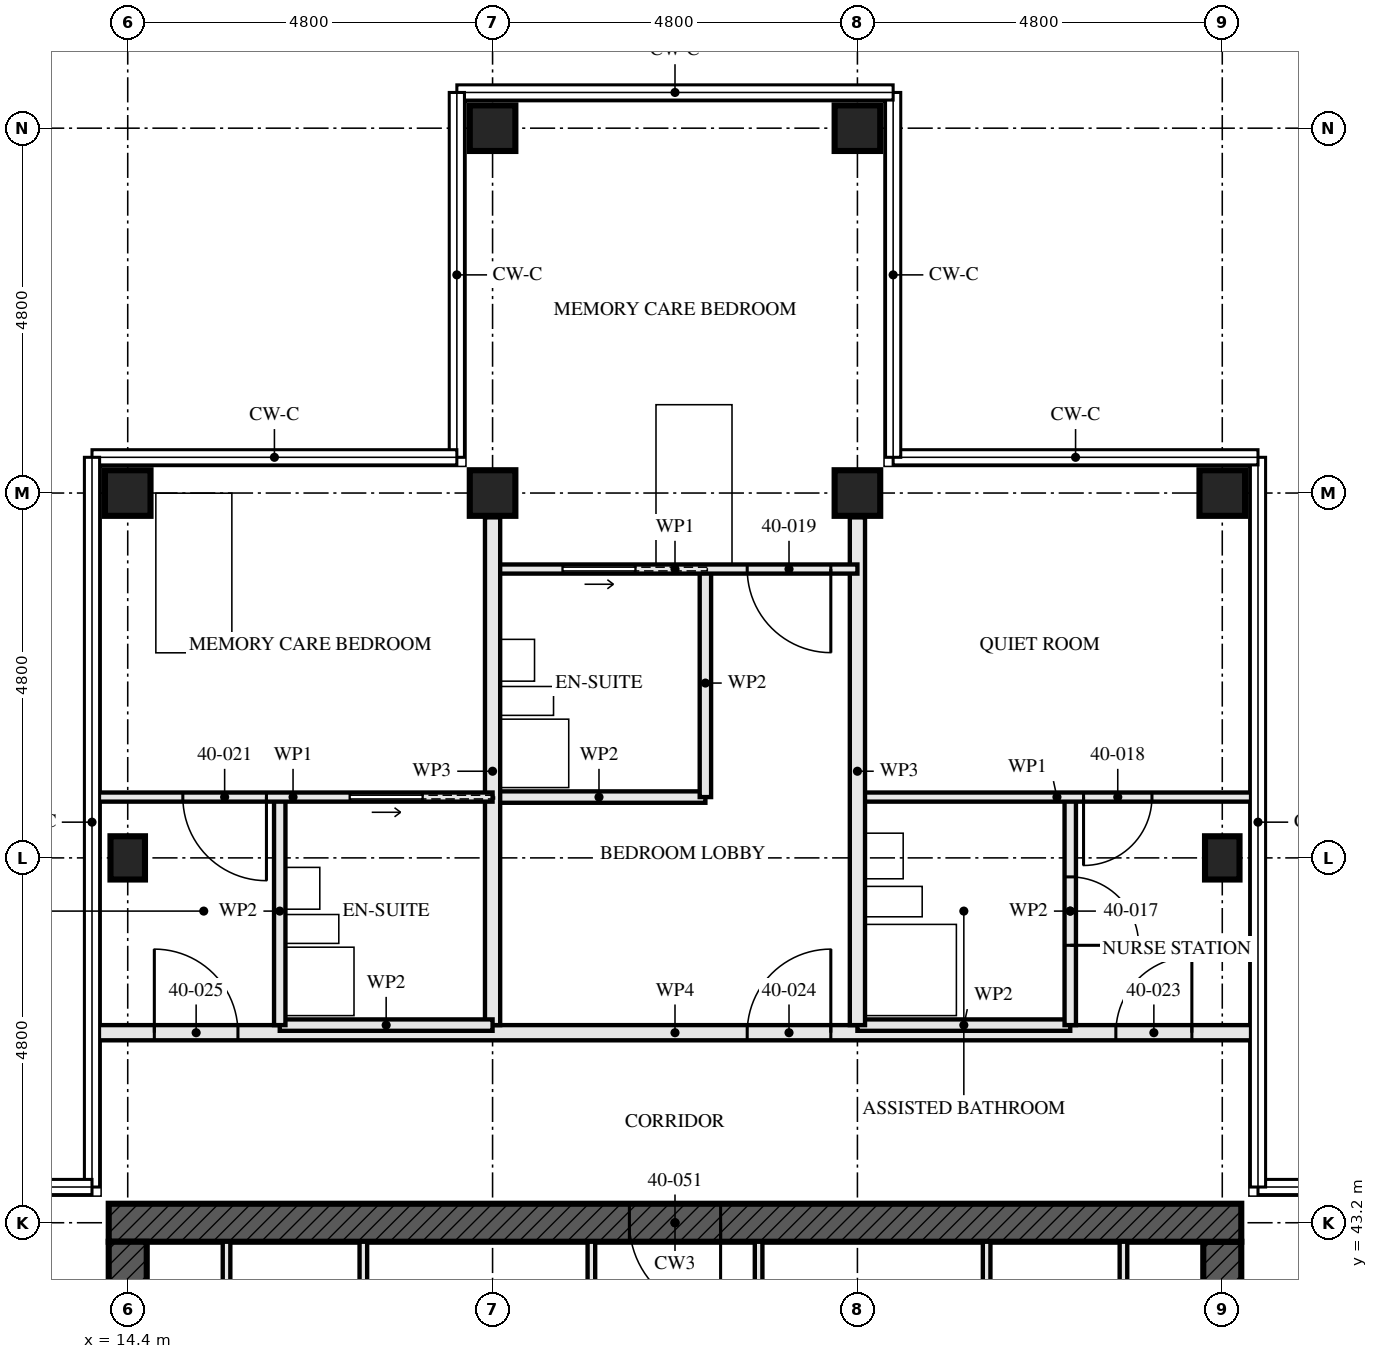
"""IFC4 building model, lengths in metres.
Left out: names, types, materials, properties, quantities, classifications, styles, units other than length and angle.
Written with IfcOpenShell. Run it as: python <this file> out.ifc"""

import sys

from ifc_helpers import new_model, si_unit, direction, frame, frame_2d, origin, origin_2d, place, context, subcontext, project, spatial, rectangle, hollow_rectangle, i_section, extrude, element, fill, save


model = new_model("IFC4")
c1 = context("Model", 3, precision=1e-05, world=origin(), true_north=direction((0.0, 1.0)))
c2 = subcontext(c1, "Body", "Model", "MODEL_VIEW")
j1 = project(units=[si_unit("LENGTHUNIT", "METRE"), si_unit("PLANEANGLEUNIT", "RADIAN")], contexts=[c1])
p1 = place(None, origin())
s1 = spatial("IfcSite", under=j1, at=p1, CompositionType="ELEMENT")
p2 = place(p1, origin())
s2 = spatial("IfcBuilding", under=s1, at=p2, CompositionType="ELEMENT")
p3 = place(p2, frame((0.0, 0.0, 148.0)))
s3 = spatial("IfcBuildingStorey", under=s2, at=p3, CompositionType="ELEMENT", Elevation=148.0)
p4 = place(p3, frame((14.4, 48.0, 0.0), z_axis=(0.0, 0.0, 1.0), x_axis=(1.0, 0.0, 0.0)))
e1 = element("IfcColumn", 1, at=p4, inside=s3, PredefinedType="COLUMN", context=c2, shape_type="SweptSolid", body=[
    extrude(i_section(OverallWidth=0.454, OverallDepth=0.569, WebThickness=0.078, FlangeThickness=0.125, FilletRadius=0.015, at=origin_2d()), origin(), (0.0, 0.0, 1.0), 3.5),
])
for number, where, z_axis, x_axis in (
    (2, (14.4, 52.8, 0.0), (0.0, 0.0, 1.0), (0.0, 1.0, 0.0)),
    (3, (19.2, 52.8, 0.0), (0.0, 0.0, 1.0), (0.0, 1.0, 0.0)),
    (4, (19.2, 57.6, 0.0), (0.0, 0.0, 1.0), (0.0, 1.0, 0.0)),
    (5, (24.0, 52.8, 0.0), (0.0, 0.0, 1.0), (0.0, 1.0, 0.0)),
    (6, (24.0, 57.6, 0.0), (0.0, 0.0, 1.0), (0.0, 1.0, 0.0)),
):
    element("IfcColumn", number, at=place(p3, frame(where, z_axis=z_axis, x_axis=x_axis)), inside=s3, PredefinedType="COLUMN", context=c2, shape_type="SweptSolid", body=[
        extrude(hollow_rectangle(XDim=0.6, YDim=0.6, WallThickness=0.05, at=origin_2d()), origin(), (0.0, 0.0, 1.0), 3.5),
    ])
p5 = place(p3, frame((28.8, 48.0, 0.0), z_axis=(0.0, 0.0, 1.0), x_axis=(1.0, 0.0, 0.0)))
e7 = element("IfcColumn", 7, at=p5, inside=s3, PredefinedType="COLUMN", context=c2, shape_type="SweptSolid", body=[
    extrude(i_section(OverallWidth=0.454, OverallDepth=0.569, WebThickness=0.078, FlangeThickness=0.125, FilletRadius=0.015, at=origin_2d()), origin(), (0.0, 0.0, 1.0), 3.5),
])
p6 = place(p3, frame((28.8, 52.8, 0.0), z_axis=(0.0, 0.0, 1.0), x_axis=(0.0, 1.0, 0.0)))
e8 = element("IfcColumn", 8, at=p6, inside=s3, PredefinedType="COLUMN", context=c2, shape_type="SweptSolid", body=[
    extrude(hollow_rectangle(XDim=0.6, YDim=0.6, WallThickness=0.05, at=origin_2d()), origin(), (0.0, 0.0, 1.0), 3.5),
])
p7 = place(p3, frame((29.05, 43.2, -0.17), z_axis=(0.0, 0.0, 1.0), x_axis=(-1.0, 0.0, 0.0)))
e9 = element("IfcWall", 9, at=p7, inside=s3, PredefinedType="SHEAR", context=c2, shape_type="SweptSolid", body=[
    extrude(rectangle(XDim=14.9, YDim=0.5, at=frame_2d((7.45, 0.0))), origin(), (0.0, 0.0, 1.0), 3.5),
])
p8 = place(p7, frame((6.85, 0.0, 0.17)))
e10 = element("IfcOpeningElement", 10, at=p8, cuts=e9, PredefinedType="OPENING", context=c2, shape_type="SweptSolid", body=[
    extrude(rectangle(XDim=1.2, YDim=2.1, at=frame_2d((0.6, 1.05))), frame((0.0, 0.26, 0.0), z_axis=(0.0, -1.0, 0.0), x_axis=(1.0, 0.0, 0.0)), (0.0, 0.0, 1.0), 0.521),
])
p9 = place(p3, frame((14.4, 42.95, -0.17), z_axis=(0.0, 0.0, 1.0), x_axis=(0.0, -1.0, 0.0)))
e11 = element("IfcWall", 11, at=p9, inside=s3, PredefinedType="SHEAR", context=c2, shape_type="SweptSolid", body=[
    extrude(rectangle(XDim=13.9, YDim=0.5, at=frame_2d((6.95, 0.0))), origin(), (0.0, 0.0, 1.0), 3.5),
])
p10 = place(p9, frame((6.35, 0.0, 0.17)))
e12 = element("IfcOpeningElement", 12, at=p10, cuts=e11, PredefinedType="OPENING", context=c2, shape_type="SweptSolid", body=[
    extrude(rectangle(XDim=1.2, YDim=2.1, at=frame_2d((0.6, 1.05))), frame((0.0, 0.26, 0.0), z_axis=(0.0, -1.0, 0.0), x_axis=(1.0, 0.0, 0.0)), (0.0, 0.0, 1.0), 0.521),
])
p11 = place(p3, frame((28.8, 29.05, -0.17), z_axis=(0.0, 0.0, 1.0), x_axis=(0.0, 1.0, 0.0)))
e13 = element("IfcWall", 13, at=p11, inside=s3, PredefinedType="SHEAR", context=c2, shape_type="SweptSolid", body=[
    extrude(rectangle(XDim=13.9, YDim=0.5, at=frame_2d((6.95, 0.0))), origin(), (0.0, 0.0, 1.0), 3.5),
])
p12 = place(p11, frame((6.35, 0.0, 0.17)))
e14 = element("IfcOpeningElement", 14, at=p12, cuts=e13, PredefinedType="OPENING", context=c2, shape_type="SweptSolid", body=[
    extrude(rectangle(XDim=1.2, YDim=2.1, at=frame_2d((0.6, 1.05))), frame((0.0, 0.26, 0.0), z_axis=(0.0, -1.0, 0.0), x_axis=(1.0, 0.0, 0.0)), (0.0, 0.0, 1.0), 0.521),
])
p13 = place(p3, frame((26.8, 48.8, 0.0), z_axis=(0.0, 0.0, 1.0), x_axis=(0.0, -1.0, 0.0)))
e15 = element("IfcWall", 15, at=p13, inside=s3, PredefinedType="PARTITIONING", context=c2, shape_type="SweptSolid", body=[
    extrude(rectangle(XDim=3.0, YDim=0.15, at=frame_2d((1.5, 0.0))), origin(), (0.0, 0.0, 1.0), 2.55),
])
p14 = place(p13, frame((1.05, 0.0, 0.0)))
e16 = element("IfcOpeningElement", 16, at=p14, cuts=e15, PredefinedType="OPENING", context=c2, shape_type="SweptSolid", body=[
    extrude(rectangle(XDim=0.9, YDim=2.1, at=frame_2d((0.45, 1.05))), frame((0.0, 0.085, 0.0), z_axis=(0.0, -1.0, 0.0), x_axis=(1.0, 0.0, 0.0)), (0.0, 0.0, 1.0), 0.171),
])
p15 = place(p3, frame((26.8, 45.8, 0.0), z_axis=(0.0, 0.0, 1.0), x_axis=(-1.0, 0.0, 0.0)))
e17 = element("IfcWall", 17, at=p15, inside=s3, PredefinedType="PARTITIONING", context=c2, shape_type="SweptSolid", body=[
    extrude(rectangle(XDim=2.8, YDim=0.15, at=frame_2d((1.4, 0.0))), origin(), (0.0, 0.0, 1.0), 3.33),
])
p16 = place(p3, frame((29.25, 48.8, 0.0), z_axis=(0.0, 0.0, 1.0), x_axis=(-1.0, 0.0, 0.0)))
e18 = element("IfcWall", 18, at=p16, inside=s3, PredefinedType="PARTITIONING", context=c2, shape_type="SweptSolid", body=[
    extrude(rectangle(XDim=5.25, YDim=0.12, at=frame_2d((2.625, 0.0))), origin(), (0.0, 0.0, 1.0), 2.32),
])
p17 = place(p16, frame((1.375, 0.0, 0.0)))
e19 = element("IfcOpeningElement", 19, at=p17, cuts=e18, PredefinedType="OPENING", context=c2, shape_type="SweptSolid", body=[
    extrude(rectangle(XDim=0.9, YDim=2.1, at=frame_2d((0.45, 1.05))), frame((0.0, 0.071, 0.0), z_axis=(0.0, -1.0, 0.0), x_axis=(1.0, 0.0, 0.0)), (0.0, 0.0, 1.0), 0.141),
])
p18 = place(p3, frame((24.0, 52.48, 0.0), z_axis=(0.0, 0.0, 1.0), x_axis=(0.0, -1.0, 0.0)))
e20 = element("IfcWall", 20, at=p18, inside=s3, PredefinedType="PARTITIONING", context=c2, shape_type="SweptSolid", body=[
    extrude(rectangle(XDim=6.68, YDim=0.2, at=frame_2d((3.34, 0.0))), origin(), (0.0, 0.0, 1.0), 2.55),
])
p19 = place(p3, frame((22.0, 51.8, 0.0), z_axis=(0.0, 0.0, 1.0), x_axis=(0.0, -1.0, 0.0)))
e21 = element("IfcWall", 21, at=p19, inside=s3, PredefinedType="PARTITIONING", context=c2, shape_type="SweptSolid", body=[
    extrude(rectangle(XDim=3.0, YDim=0.15, at=frame_2d((1.5, 0.0))), origin(), (0.0, 0.0, 1.0), 3.33),
])
p20 = place(p3, frame((22.0, 48.8, 0.0), z_axis=(0.0, 0.0, 1.0), x_axis=(-1.0, 0.0, 0.0)))
e22 = element("IfcWall", 22, at=p20, inside=s3, PredefinedType="PARTITIONING", context=c2, shape_type="SweptSolid", body=[
    extrude(rectangle(XDim=2.8, YDim=0.15, at=frame_2d((1.4, 0.0))), origin(), (0.0, 0.0, 1.0), 3.33),
])
p21 = place(p3, frame((24.0, 51.8, 0.0), z_axis=(0.0, 0.0, 1.0), x_axis=(-1.0, 0.0, 0.0)))
e23 = element("IfcWall", 23, at=p21, inside=s3, PredefinedType="PARTITIONING", context=c2, shape_type="SweptSolid", body=[
    extrude(rectangle(XDim=4.8, YDim=0.12, at=frame_2d((2.4, 0.0))), origin(), (0.0, 0.0, 1.0), 3.33),
])
p22 = place(p21, frame((0.35, 0.0, 0.0)))
e24 = element("IfcOpeningElement", 24, at=p22, cuts=e23, PredefinedType="OPENING", context=c2, shape_type="SweptSolid", body=[
    extrude(rectangle(XDim=1.1, YDim=2.1, at=frame_2d((0.55, 1.05))), frame((0.0, 0.071, 0.0), z_axis=(0.0, -1.0, 0.0), x_axis=(1.0, 0.0, 0.0)), (0.0, 0.0, 1.0), 0.141),
])
p23 = place(p21, frame((2.925, 0.0, 0.0)))
e25 = element("IfcOpeningElement", 25, at=p23, cuts=e23, PredefinedType="OPENING", context=c2, shape_type="SweptSolid", body=[
    extrude(rectangle(XDim=0.95, YDim=2.1, at=frame_2d((0.475, 1.05))), frame((0.0, 0.071, 0.0), z_axis=(0.0, -1.0, 0.0), x_axis=(1.0, 0.0, 0.0)), (0.0, 0.0, 1.0), 0.141),
])
p24 = place(p3, frame((19.2, 52.48, 0.0), z_axis=(0.0, 0.0, 1.0), x_axis=(0.0, -1.0, 0.0)))
e26 = element("IfcWall", 26, at=p24, inside=s3, PredefinedType="PARTITIONING", context=c2, shape_type="SweptSolid", body=[
    extrude(rectangle(XDim=6.68, YDim=0.2, at=frame_2d((3.34, 0.0))), origin(), (0.0, 0.0, 1.0), 2.55),
])
p25 = place(p3, frame((16.4, 48.8, 0.0), z_axis=(0.0, 0.0, 1.0), x_axis=(0.0, -1.0, 0.0)))
e27 = element("IfcWall", 27, at=p25, inside=s3, PredefinedType="PARTITIONING", context=c2, shape_type="SweptSolid", body=[
    extrude(rectangle(XDim=3.0, YDim=0.15, at=frame_2d((1.5, 0.0))), origin(), (0.0, 0.0, 1.0), 2.55),
])
p26 = place(p3, frame((19.2, 45.8, 0.0), z_axis=(0.0, 0.0, 1.0), x_axis=(-1.0, 0.0, 0.0)))
e28 = element("IfcWall", 28, at=p26, inside=s3, PredefinedType="PARTITIONING", context=c2, shape_type="SweptSolid", body=[
    extrude(rectangle(XDim=2.8, YDim=0.15, at=frame_2d((1.4, 0.0))), origin(), (0.0, 0.0, 1.0), 3.33),
])
p27 = place(p3, frame((19.2, 48.8, 0.0), z_axis=(0.0, 0.0, 1.0), x_axis=(-1.0, 0.0, 0.0)))
e29 = element("IfcWall", 29, at=p27, inside=s3, PredefinedType="PARTITIONING", context=c2, shape_type="SweptSolid", body=[
    extrude(rectangle(XDim=5.25, YDim=0.12, at=frame_2d((2.625, 0.0))), origin(), (0.0, 0.0, 1.0), 2.32),
])
p28 = place(p27, frame((2.975, 0.0, 0.0)))
e30 = element("IfcOpeningElement", 30, at=p28, cuts=e29, PredefinedType="OPENING", context=c2, shape_type="SweptSolid", body=[
    extrude(rectangle(XDim=1.1, YDim=2.1, at=frame_2d((0.55, 1.05))), frame((0.0, 0.071, 0.0), z_axis=(0.0, -1.0, 0.0), x_axis=(1.0, 0.0, 0.0)), (0.0, 0.0, 1.0), 0.141),
])
p29 = place(p27, frame((0.925, 0.0, 0.0)))
e31 = element("IfcOpeningElement", 31, at=p29, cuts=e29, PredefinedType="OPENING", context=c2, shape_type="SweptSolid", body=[
    extrude(rectangle(XDim=0.95, YDim=2.1, at=frame_2d((0.475, 1.05))), frame((0.0, 0.071, 0.0), z_axis=(0.0, -1.0, 0.0), x_axis=(1.0, 0.0, 0.0)), (0.0, 0.0, 1.0), 0.141),
])
p30 = place(p3, frame((29.25, 45.7, 0.0), z_axis=(0.0, 0.0, 1.0), x_axis=(-1.0, 0.0, 0.0)))
e32 = element("IfcWall", 32, at=p30, inside=s3, PredefinedType="PARTITIONING", context=c2, shape_type="SweptSolid", body=[
    extrude(rectangle(XDim=15.3, YDim=0.2, at=frame_2d((7.65, 0.0))), origin(), (0.0, 0.0, 1.0), 2.32),
])
p31 = place(p30, frame((0.85, 0.0, 0.0)))
e33 = element("IfcOpeningElement", 33, at=p31, cuts=e32, PredefinedType="OPENING", context=c2, shape_type="SweptSolid", body=[
    extrude(rectangle(XDim=1.0, YDim=2.1, at=frame_2d((0.5, 1.05))), frame((0.0, 0.111, 0.0), z_axis=(0.0, -1.0, 0.0), x_axis=(1.0, 0.0, 0.0)), (0.0, 0.0, 1.0), 0.221),
])
p32 = place(p30, frame((5.6, 0.0, 0.0)))
e34 = element("IfcOpeningElement", 34, at=p32, cuts=e32, PredefinedType="OPENING", context=c2, shape_type="SweptSolid", body=[
    extrude(rectangle(XDim=1.1, YDim=2.1, at=frame_2d((0.55, 1.05))), frame((0.0, 0.111, 0.0), z_axis=(0.0, -1.0, 0.0), x_axis=(1.0, 0.0, 0.0)), (0.0, 0.0, 1.0), 0.221),
])
p33 = place(p30, frame((13.4, 0.0, 0.0)))
e35 = element("IfcOpeningElement", 35, at=p33, cuts=e32, PredefinedType="OPENING", context=c2, shape_type="SweptSolid", body=[
    extrude(rectangle(XDim=1.1, YDim=2.1, at=frame_2d((0.55, 1.05))), frame((0.0, 0.111, 0.0), z_axis=(0.0, -1.0, 0.0), x_axis=(1.0, 0.0, 0.0)), (0.0, 0.0, 1.0), 0.221),
])
for number, where, z_axis, x_axis in (
    (36, (15.7, 37.15, 0.0), (0.0, 0.0, 1.0), (0.0, 1.0, 0.0)),
    (37, (27.5, 37.15, 0.0), (0.0, 0.0, 1.0), (0.0, 1.0, 0.0)),
):
    element("IfcWall", number, at=place(p3, frame(where, z_axis=z_axis, x_axis=x_axis)), inside=s3, PredefinedType="SOLIDWALL", context=c2, shape_type="SweptSolid", body=[
        extrude(rectangle(XDim=5.8, YDim=0.1, at=frame_2d((2.9, 0.0))), origin(), (0.0, 0.0, 1.0), 3.33),
    ])
p34 = place(p3, frame((20.5, 37.15, 0.0), z_axis=(0.0, 0.0, 1.0), x_axis=(0.0, 1.0, 0.0)))
e38 = element("IfcWall", 38, at=p34, inside=s3, PredefinedType="SOLIDWALL", context=c2, shape_type="SweptSolid", body=[
    extrude(rectangle(XDim=5.8, YDim=0.1, at=frame_2d((2.9, 0.0))), origin(), (0.0, 0.0, 1.0), 3.33),
])
p35 = place(p34, frame((0.975, 0.0, 0.0)))
e39 = element("IfcOpeningElement", 39, at=p35, cuts=e38, PredefinedType="OPENING", context=c2, shape_type="SweptSolid", body=[
    extrude(rectangle(XDim=0.9, YDim=2.1, at=frame_2d((0.45, 1.05))), frame((0.0, 0.061, 0.0), z_axis=(0.0, -1.0, 0.0), x_axis=(1.0, 0.0, 0.0)), (0.0, 0.0, 1.0), 0.121),
])
p36 = place(p3, frame((22.7, 37.15, 0.0), z_axis=(0.0, 0.0, 1.0), x_axis=(0.0, 1.0, 0.0)))
e40 = element("IfcWall", 40, at=p36, inside=s3, PredefinedType="SOLIDWALL", context=c2, shape_type="SweptSolid", body=[
    extrude(rectangle(XDim=5.8, YDim=0.1, at=frame_2d((2.9, 0.0))), origin(), (0.0, 0.0, 1.0), 3.33),
])
p37 = place(p36, frame((0.975, 0.0, 0.0)))
e41 = element("IfcOpeningElement", 41, at=p37, cuts=e40, PredefinedType="OPENING", context=c2, shape_type="SweptSolid", body=[
    extrude(rectangle(XDim=0.9, YDim=2.1, at=frame_2d((0.45, 1.05))), frame((0.0, 0.061, 0.0), z_axis=(0.0, -1.0, 0.0), x_axis=(1.0, 0.0, 0.0)), (0.0, 0.0, 1.0), 0.121),
])
for number, where, z_axis, x_axis in (
    (42, (17.5, 37.15, 0.0), (0.0, 0.0, 1.0), (0.0, 1.0, 0.0)),
    (43, (25.7, 37.15, 0.0), (0.0, 0.0, 1.0), (0.0, 1.0, 0.0)),
):
    element("IfcWall", number, at=place(p3, frame(where, z_axis=z_axis, x_axis=x_axis)), inside=s3, PredefinedType="SOLIDWALL", context=c2, shape_type="SweptSolid", body=[
        extrude(rectangle(XDim=5.8, YDim=0.1, at=frame_2d((2.9, 0.0))), origin(), (0.0, 0.0, 1.0), 3.33),
    ])
p38 = place(p14, origin())
e44 = element("IfcDoor", 44, at=p38, inside=s3, OperationType="SINGLE_SWING_LEFT", PredefinedType="DOOR", context=c2, shape_type="SweptSolid", body=[
    extrude(rectangle(XDim=0.9, YDim=2.1, at=frame_2d((0.45, 1.05))), frame((0.0, 0.022, 0.0), z_axis=(0.0, -1.0, 0.0), x_axis=(1.0, 0.0, 0.0)), (0.0, 0.0, 1.0), 0.044),
])
fill(e16, e44)
p39 = place(p17, origin())
e45 = element("IfcDoor", 45, at=p39, inside=s3, OperationType="SINGLE_SWING_LEFT", PredefinedType="DOOR", context=c2, shape_type="SweptSolid", body=[
    extrude(rectangle(XDim=0.9, YDim=2.1, at=frame_2d((0.45, 1.05))), frame((0.0, 0.022, 0.0), z_axis=(0.0, -1.0, 0.0), x_axis=(1.0, 0.0, 0.0)), (0.0, 0.0, 1.0), 0.044),
])
fill(e19, e45)
p40 = place(p22, origin())
e46 = element("IfcDoor", 46, at=p40, inside=s3, OperationType="SINGLE_SWING_RIGHT", PredefinedType="DOOR", context=c2, shape_type="SweptSolid", body=[
    extrude(rectangle(XDim=1.1, YDim=2.1, at=frame_2d((0.55, 1.05))), frame((0.0, 0.022, 0.0), z_axis=(0.0, -1.0, 0.0), x_axis=(1.0, 0.0, 0.0)), (0.0, 0.0, 1.0), 0.044),
])
fill(e24, e46)
p41 = place(p23, origin())
e47 = element("IfcDoor", 47, at=p41, inside=s3, OperationType="SLIDING_TO_RIGHT", PredefinedType="DOOR", context=c2, shape_type="SweptSolid", body=[
    extrude(rectangle(XDim=0.95, YDim=2.1, at=frame_2d((0.475, 1.05))), frame((0.0, 0.022, 0.0), z_axis=(0.0, -1.0, 0.0), x_axis=(1.0, 0.0, 0.0)), (0.0, 0.0, 1.0), 0.044),
])
fill(e25, e47)
p42 = place(p28, origin())
e48 = element("IfcDoor", 48, at=p42, inside=s3, OperationType="SINGLE_SWING_RIGHT", PredefinedType="DOOR", context=c2, shape_type="SweptSolid", body=[
    extrude(rectangle(XDim=1.1, YDim=2.1, at=frame_2d((0.55, 1.05))), frame((0.0, 0.022, 0.0), z_axis=(0.0, -1.0, 0.0), x_axis=(1.0, 0.0, 0.0)), (0.0, 0.0, 1.0), 0.044),
])
fill(e30, e48)
p43 = place(p29, origin())
e49 = element("IfcDoor", 49, at=p43, inside=s3, OperationType="SLIDING_TO_RIGHT", PredefinedType="DOOR", context=c2, shape_type="SweptSolid", body=[
    extrude(rectangle(XDim=0.95, YDim=2.1, at=frame_2d((0.475, 1.05))), frame((0.0, 0.022, 0.0), z_axis=(0.0, -1.0, 0.0), x_axis=(1.0, 0.0, 0.0)), (0.0, 0.0, 1.0), 0.044),
])
fill(e31, e49)
p44 = place(p31, frame((1.0, 0.0, 0.0), z_axis=(0.0, 0.0, 1.0), x_axis=(-1.0, 0.0, 0.0)))
e50 = element("IfcDoor", 50, at=p44, inside=s3, OperationType="SINGLE_SWING_LEFT", PredefinedType="DOOR", context=c2, shape_type="SweptSolid", body=[
    extrude(rectangle(XDim=1.0, YDim=2.1, at=frame_2d((0.5, 1.05))), frame((0.0, 0.027, 0.0), z_axis=(0.0, -1.0, 0.0), x_axis=(1.0, 0.0, 0.0)), (0.0, 0.0, 1.0), 0.054),
])
fill(e33, e50)
p45 = place(p32, frame((1.1, 0.0, 0.0), z_axis=(0.0, 0.0, 1.0), x_axis=(-1.0, 0.0, 0.0)))
e51 = element("IfcDoor", 51, at=p45, inside=s3, OperationType="SINGLE_SWING_LEFT", PredefinedType="DOOR", context=c2, shape_type="SweptSolid", body=[
    extrude(rectangle(XDim=1.1, YDim=2.1, at=frame_2d((0.55, 1.05))), frame((0.0, 0.027, 0.0), z_axis=(0.0, -1.0, 0.0), x_axis=(1.0, 0.0, 0.0)), (0.0, 0.0, 1.0), 0.054),
])
fill(e34, e51)
p46 = place(p33, frame((1.1, 0.0, 0.0), z_axis=(0.0, 0.0, 1.0), x_axis=(-1.0, 0.0, 0.0)))
e52 = element("IfcDoor", 52, at=p46, inside=s3, OperationType="SINGLE_SWING_RIGHT", PredefinedType="DOOR", context=c2, shape_type="SweptSolid", body=[
    extrude(rectangle(XDim=1.1, YDim=2.1, at=frame_2d((0.55, 1.05))), frame((0.0, 0.027, 0.0), z_axis=(0.0, -1.0, 0.0), x_axis=(1.0, 0.0, 0.0)), (0.0, 0.0, 1.0), 0.054),
])
fill(e35, e52)
p47 = place(p8, origin())
e53 = element("IfcDoor", 53, at=p47, inside=s3, OperationType="SINGLE_SWING_LEFT", PredefinedType="DOOR", context=c2, shape_type="SweptSolid", body=[
    extrude(rectangle(XDim=1.2, YDim=2.1, at=frame_2d((0.6, 1.05))), frame((0.0, 0.027, 0.0), z_axis=(0.0, -1.0, 0.0), x_axis=(1.0, 0.0, 0.0)), (0.0, 0.0, 1.0), 0.054),
])
fill(e10, e53)
save(model, sys.argv[1])
